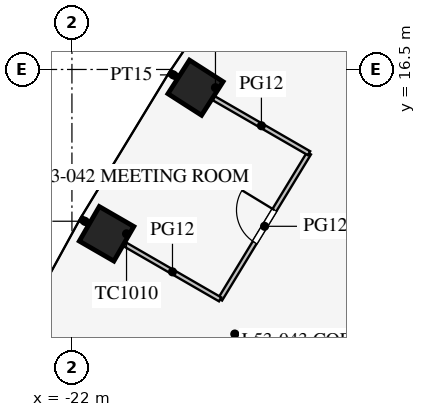
"""IFC4 building model, lengths in metres.
Left out: names, types, materials, properties, quantities, classifications, styles, units other than length and angle.
Written with IfcOpenShell. Run it as: python <this file> out.ifc"""

import sys

from ifc_helpers import new_model, si_unit, direction, frame, frame_2d, origin, origin_2d, place, context, subcontext, project, spatial, rectangle, extrude, element, fill, save


model = new_model("IFC4")
c1 = context("Model", 3, precision=1e-05, world=origin(), true_north=direction((0.0, 1.0)))
c2 = subcontext(c1, "Body", "Model", "MODEL_VIEW")
j1 = project(units=[si_unit("LENGTHUNIT", "METRE"), si_unit("PLANEANGLEUNIT", "RADIAN")], contexts=[c1])
p1 = place(None, origin())
s1 = spatial("IfcSite", under=j1, at=p1, CompositionType="ELEMENT")
p2 = place(p1, origin())
s2 = spatial("IfcBuilding", under=s1, at=p2, CompositionType="ELEMENT")
p3 = place(p2, frame((0.0, 0.0, 231.7)))
s3 = spatial("IfcBuildingStorey", under=s2, at=p3, CompositionType="ELEMENT", Elevation=231.7)
for number, where, z_axis, x_axis in (
    (1, (-18.748, 16.02, 0.0), (0.0, 0.0, 1.0), (-0.539, -0.842, 0.0)),
    (2, (-21.088, 12.175, 0.0), (0.0, 0.0, 1.0), (-0.5, -0.866, 0.0)),
):
    element("IfcColumn", number, at=place(p3, frame(where, z_axis=z_axis, x_axis=x_axis)), inside=s3, PredefinedType="COLUMN", context=c2, shape_type="SweptSolid", body=[
        extrude(rectangle(XDim=1.05, YDim=1.05, at=origin_2d()), origin(), (0.0, 0.0, 1.0), 4.2),
    ])
p4 = place(p3, frame((-5.773, 16.0, 0.0), z_axis=(0.0, 0.0, 1.0), x_axis=(-0.500002442456, -0.866023993627, 0.0)))
e3 = element("IfcWall", 3, at=p4, inside=s3, PredefinedType="SHEAR", context=c2, shape_type="SweptSolid", body=[
    extrude(rectangle(XDim=21.939, YDim=0.7, at=frame_2d((10.97, 0.0))), origin(), (0.0, 0.0, 1.0), 4.2),
])
p5 = place(p4, frame((17.27, 0.0, 0.0)))
e4 = element("IfcOpeningElement", 4, at=p5, cuts=e3, PredefinedType="OPENING", context=c2, shape_type="SweptSolid", body=[
    extrude(rectangle(XDim=1.2, YDim=2.1, at=frame_2d((0.6, 1.05))), frame((0.0, 0.36, 0.0), z_axis=(0.0, -1.0, 0.0), x_axis=(1.0, 0.0, 0.0)), (0.0, 0.0, 1.0), 0.72),
])
p6 = place(p4, frame((3.47, 0.0, 0.0)))
e5 = element("IfcOpeningElement", 5, at=p6, cuts=e3, PredefinedType="OPENING", context=c2, shape_type="SweptSolid", body=[
    extrude(rectangle(XDim=1.2, YDim=2.1, at=frame_2d((0.6, 1.05))), frame((0.0, 0.36, 0.0), z_axis=(0.0, -1.0, 0.0), x_axis=(1.0, 0.0, 0.0)), (0.0, 0.0, 1.0), 0.72),
])
p7 = place(p3, frame((-0.016, 30.392, 0.0), z_axis=(0.0, 0.0, 1.0), x_axis=(-0.500000626146, -0.866025042278, 0.0)))
e6 = element("IfcWall", 6, at=p7, inside=s3, PredefinedType="PARTITIONING", context=c2, shape_type="SweptSolid", body=[
    extrude(rectangle(XDim=52.624, YDim=0.12, at=frame_2d((26.312, 0.0))), origin(), (0.0, 0.0, 1.0), 2.9),
])
p8 = place(p7, frame((10.15, 0.0, 0.15)))
e7 = element("IfcOpeningElement", 7, at=p8, cuts=e6, PredefinedType="OPENING", context=c2, shape_type="SweptSolid", body=[
    extrude(rectangle(XDim=1.8, YDim=2.1, at=frame_2d((0.9, 1.05))), frame((0.0, 0.07, 0.0), z_axis=(0.0, -1.0, 0.0), x_axis=(1.0, 0.0, 0.0)), (0.0, 0.0, 1.0), 0.14),
])
p9 = place(p7, frame((40.65, 0.0, 0.15)))
e8 = element("IfcOpeningElement", 8, at=p9, cuts=e6, PredefinedType="OPENING", context=c2, shape_type="SweptSolid", body=[
    extrude(rectangle(XDim=1.8, YDim=2.1, at=frame_2d((0.9, 1.05))), frame((0.0, 0.07, 0.0), z_axis=(0.0, -1.0, 0.0), x_axis=(1.0, 0.0, 0.0)), (0.0, 0.0, 1.0), 0.14),
])
p10 = place(p3, frame((-21.546, 12.44, 0.0), z_axis=(0.0, 0.0, 1.0), x_axis=(-0.866032814021, 0.499987164874, 0.0)))
e9 = element("IfcWall", 9, at=p10, inside=s3, PredefinedType="PARTITIONING", context=c2, shape_type="SweptSolid", body=[
    extrude(rectangle(XDim=0.266, YDim=0.15, at=frame_2d((0.133, 0.0))), origin(), (0.0, 0.0, 1.0), 2.9),
])
p11 = place(p3, frame((-19.227, 16.297, 0.0), z_axis=(0.0, 0.0, 1.0), x_axis=(-0.866135455726, 0.499809335981, 0.0)))
e10 = element("IfcWall", 10, at=p11, inside=s3, PredefinedType="PARTITIONING", context=c2, shape_type="SweptSolid", body=[
    extrude(rectangle(XDim=0.243, YDim=0.15, at=frame_2d((0.122, 0.0))), origin(), (0.0, 0.0, 1.0), 2.9),
])
p12 = place(p3, frame((-15.761, 14.296, 0.0), z_axis=(0.0, 0.0, 1.0), x_axis=(-0.519790350351, -0.85429385558, 0.0)))
e11 = element("IfcWall", 11, at=p12, inside=s3, PredefinedType="PARTITIONING", context=c2, shape_type="SweptSolid", body=[
    extrude(rectangle(XDim=4.501, YDim=0.12, at=frame_2d((2.25, 0.0))), origin(), (0.0, 0.0, 1.0), 2.9),
])
p13 = place(p12, frame((1.75, 0.0, 0.15)))
e12 = element("IfcOpeningElement", 12, at=p13, cuts=e11, PredefinedType="OPENING", context=c2, shape_type="SweptSolid", body=[
    extrude(rectangle(XDim=1.0, YDim=2.1, at=frame_2d((0.5, 1.05))), frame((0.0, 0.07, 0.0), z_axis=(0.0, -1.0, 0.0), x_axis=(1.0, 0.0, 0.0)), (0.0, 0.0, 1.0), 0.14),
])
p14 = place(p3, frame((-18.101, 10.45, 0.0), z_axis=(0.0, 0.0, 1.0), x_axis=(-0.866054979466, 0.499948769917, 0.0)))
e13 = element("IfcWall", 13, at=p14, inside=s3, PredefinedType="PARTITIONING", context=c2, shape_type="SweptSolid", body=[
    extrude(rectangle(XDim=2.895, YDim=0.12, at=frame_2d((1.447, 0.0))), origin(), (0.0, 0.0, 1.0), 2.9),
])
p15 = place(p3, frame((-15.761, 14.296, 0.0), z_axis=(0.0, 0.0, 1.0), x_axis=(-0.866022596503, 0.500004862322, 0.0)))
e14 = element("IfcWall", 14, at=p15, inside=s3, PredefinedType="PARTITIONING", context=c2, shape_type="SweptSolid", body=[
    extrude(rectangle(XDim=2.894, YDim=0.12, at=frame_2d((1.447, 0.0))), origin(), (0.0, 0.0, 1.0), 2.9),
])
p16 = place(p13, frame((1.0, 0.0, 0.0), z_axis=(0.0, 0.0, 1.0), x_axis=(-1.0, 0.0, 0.0)))
e15 = element("IfcDoor", 15, at=p16, inside=s3, OperationType="SINGLE_SWING_RIGHT", PredefinedType="DOOR", context=c2, shape_type="SweptSolid", body=[
    extrude(rectangle(XDim=1.0, YDim=2.1, at=frame_2d((0.5, 1.05))), frame((0.0, 0.025, 0.0), z_axis=(0.0, -1.0, 0.0), x_axis=(1.0, 0.0, 0.0)), (0.0, 0.0, 1.0), 0.05),
])
fill(e12, e15)
save(model, sys.argv[1])
